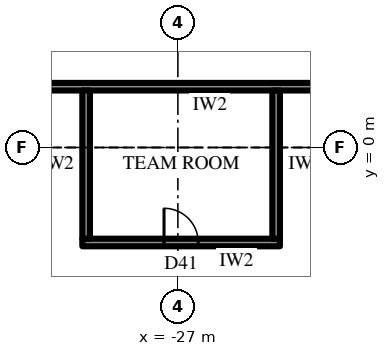
"""IFC4 building model, lengths in metres.
Left out: names, types, materials, properties, quantities, classifications, styles, units other than length and angle.
Written with IfcOpenShell. Run it as: python <this file> out.ifc"""

import sys

from ifc_helpers import new_model, si_unit, direction, frame, frame_2d, origin, place, context, subcontext, project, spatial, rectangle, extrude, element, fill, save


model = new_model("IFC4")
c1 = context("Model", 3, precision=1e-05, world=origin(), true_north=direction((0.0, 1.0)))
c2 = subcontext(c1, "Body", "Model", "MODEL_VIEW")
j1 = project(units=[si_unit("LENGTHUNIT", "METRE"), si_unit("PLANEANGLEUNIT", "RADIAN")], contexts=[c1])
p1 = place(None, origin())
s1 = spatial("IfcSite", under=j1, at=p1, CompositionType="ELEMENT")
p2 = place(p1, origin())
s2 = spatial("IfcBuilding", under=s1, at=p2, CompositionType="ELEMENT")
p3 = place(p2, frame((0.0, 0.0, 182.5)))
s3 = spatial("IfcBuildingStorey", under=s2, at=p3, CompositionType="ELEMENT", Elevation=182.5)
p4 = place(p3, frame((-34.656, -2.675, 0.0), z_axis=(0.0, 0.0, 1.0), x_axis=(0.500003084452, -0.866023622968, 0.0)))
e1 = element("IfcWall", 1, at=p4, inside=s3, PredefinedType="SOLIDWALL", context=c2, shape_type="SweptSolid", body=[
    extrude(rectangle(XDim=30.022, YDim=0.3, at=frame_2d((15.011, 0.0))), origin(), (0.0, 0.0, 1.0), 2.75),
])
p5 = place(p4, frame((1.052, 0.0, 0.6)))
e2 = element("IfcOpeningElement", 2, at=p5, cuts=e1, PredefinedType="OPENING", context=c2, shape_type="SweptSolid", body=[
    extrude(rectangle(XDim=2.9, YDim=1.9, at=frame_2d((1.45, 0.95))), frame((0.0, 0.16, 0.0), z_axis=(0.0, -1.0, 0.0), x_axis=(1.0, 0.0, 0.0)), (0.0, 0.0, 1.0), 0.32),
])
p6 = place(p4, frame((6.056, 0.0, 0.6)))
e3 = element("IfcOpeningElement", 3, at=p6, cuts=e1, PredefinedType="OPENING", context=c2, shape_type="SweptSolid", body=[
    extrude(rectangle(XDim=2.9, YDim=1.9, at=frame_2d((1.45, 0.95))), frame((0.0, 0.16, 0.0), z_axis=(0.0, -1.0, 0.0), x_axis=(1.0, 0.0, 0.0)), (0.0, 0.0, 1.0), 0.32),
])
p7 = place(p4, frame((11.909, 0.0, 0.0)))
e4 = element("IfcOpeningElement", 4, at=p7, cuts=e1, PredefinedType="OPENING", context=c2, shape_type="SweptSolid", body=[
    extrude(rectangle(XDim=1.2, YDim=2.4, at=frame_2d((0.6, 1.2))), frame((0.0, 0.16, 0.0), z_axis=(0.0, -1.0, 0.0), x_axis=(1.0, 0.0, 0.0)), (0.0, 0.0, 1.0), 0.32),
])
p8 = place(p4, frame((16.063, 0.0, 0.6)))
e5 = element("IfcOpeningElement", 5, at=p8, cuts=e1, PredefinedType="OPENING", context=c2, shape_type="SweptSolid", body=[
    extrude(rectangle(XDim=2.9, YDim=1.9, at=frame_2d((1.45, 0.95))), frame((0.0, 0.16, 0.0), z_axis=(0.0, -1.0, 0.0), x_axis=(1.0, 0.0, 0.0)), (0.0, 0.0, 1.0), 0.32),
])
p9 = place(p4, frame((21.067, 0.0, 0.6)))
e6 = element("IfcOpeningElement", 6, at=p9, cuts=e1, PredefinedType="OPENING", context=c2, shape_type="SweptSolid", body=[
    extrude(rectangle(XDim=2.9, YDim=1.9, at=frame_2d((1.45, 0.95))), frame((0.0, 0.16, 0.0), z_axis=(0.0, -1.0, 0.0), x_axis=(1.0, 0.0, 0.0)), (0.0, 0.0, 1.0), 0.32),
])
p10 = place(p4, frame((26.07, 0.0, 0.6)))
e7 = element("IfcOpeningElement", 7, at=p10, cuts=e1, PredefinedType="OPENING", context=c2, shape_type="SweptSolid", body=[
    extrude(rectangle(XDim=2.9, YDim=1.9, at=frame_2d((1.45, 0.95))), frame((0.0, 0.16, 0.0), z_axis=(0.0, -1.0, 0.0), x_axis=(1.0, 0.0, 0.0)), (0.0, 0.0, 1.0), 0.32),
])
p11 = place(p3, frame((-18.6, 1.6, 0.0), z_axis=(0.0, 0.0, 1.0), x_axis=(-1.0, 0.0, 0.0)))
e8 = element("IfcWall", 8, at=p11, inside=s3, PredefinedType="PARTITIONING", context=c2, shape_type="SweptSolid", body=[
    extrude(rectangle(XDim=15.117, YDim=0.2, at=frame_2d((7.559, 0.0))), origin(), (0.0, 0.0, 1.0), 4.0),
])
p12 = place(p11, frame((1.012, 0.0, 0.0)))
e9 = element("IfcOpeningElement", 9, at=p12, cuts=e8, PredefinedType="OPENING", context=c2, shape_type="SweptSolid", body=[
    extrude(rectangle(XDim=1.0, YDim=2.2, at=frame_2d((0.5, 1.1))), frame((0.0, 0.11, 0.0), z_axis=(0.0, -1.0, 0.0), x_axis=(1.0, 0.0, 0.0)), (0.0, 0.0, 1.0), 0.22),
])
p13 = place(p3, frame((-24.314, -2.5, 0.0), z_axis=(0.0, 0.0, 1.0), x_axis=(-1.0, 0.0, 0.0)))
e10 = element("IfcWall", 10, at=p13, inside=s3, PredefinedType="PARTITIONING", context=c2, shape_type="SweptSolid", body=[
    extrude(rectangle(XDim=5.2, YDim=0.2, at=frame_2d((2.6, 0.0))), origin(), (0.0, 0.0, 1.0), 4.0),
])
p14 = place(p13, frame((2.15, 0.0, 0.0)))
e11 = element("IfcOpeningElement", 11, at=p14, cuts=e10, PredefinedType="OPENING", context=c2, shape_type="SweptSolid", body=[
    extrude(rectangle(XDim=0.9, YDim=2.2, at=frame_2d((0.45, 1.1))), frame((0.0, 0.11, 0.0), z_axis=(0.0, -1.0, 0.0), x_axis=(1.0, 0.0, 0.0)), (0.0, 0.0, 1.0), 0.22),
])
for number, where, z_axis, x_axis in (
    (12, (-24.415, 1.5, 0.0), (0.0, 0.0, 1.0), (0.0, -1.0, 0.0)),
    (13, (-29.415, 1.5, 0.0), (0.0, 0.0, 1.0), (0.0, -1.0, 0.0)),
):
    element("IfcWall", number, at=place(p3, frame(where, z_axis=z_axis, x_axis=x_axis)), inside=s3, PredefinedType="PARTITIONING", context=c2, shape_type="SweptSolid", body=[
        extrude(rectangle(XDim=3.9, YDim=0.2, at=frame_2d((1.95, 0.0))), origin(), (0.0, 0.0, 1.0), 4.0),
    ])
p15 = place(p14, frame((0.9, 0.0, 0.0), z_axis=(0.0, 0.0, 1.0), x_axis=(-1.0, 0.0, 0.0)))
e14 = element("IfcDoor", 14, at=p15, inside=s3, OperationType="SINGLE_SWING_RIGHT", PredefinedType="DOOR", context=c2, shape_type="SweptSolid", body=[
    extrude(rectangle(XDim=0.9, YDim=2.2, at=frame_2d((0.45, 1.1))), frame((0.0, 0.025, 0.0), z_axis=(0.0, -1.0, 0.0), x_axis=(1.0, 0.0, 0.0)), (0.0, 0.0, 1.0), 0.05),
])
fill(e11, e14)
save(model, sys.argv[1])
